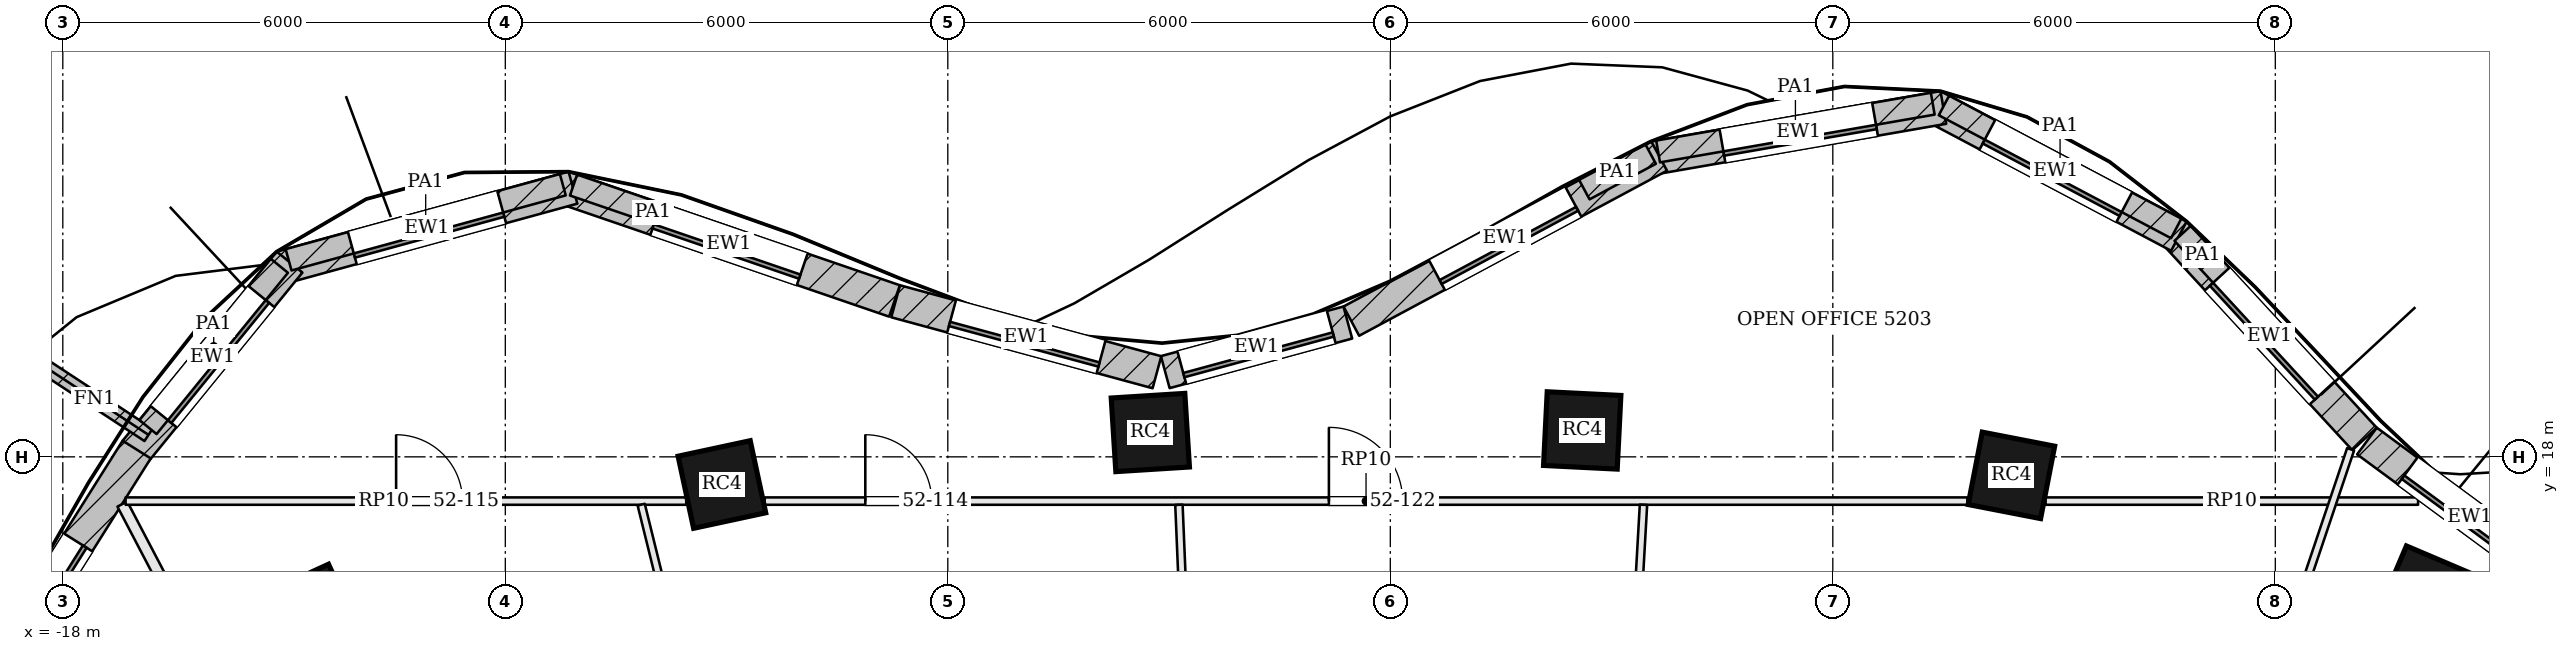
"""IFC4 building model, lengths in metres.
Left out: names, types, materials, properties, quantities, classifications, styles, units other than length and angle.
Written with IfcOpenShell. Run it as: python <this file> out.ifc"""

import sys

from ifc_helpers import new_model, si_unit, direction, frame, frame_2d, origin, origin_2d, place, context, subcontext, project, spatial, rectangle, extrude, element, fill, save


model = new_model("IFC4")
c1 = context("Model", 3, precision=1e-05, world=origin(), true_north=direction((0.0, 1.0)))
c2 = subcontext(c1, "Body", "Model", "MODEL_VIEW")
j1 = project(units=[si_unit("LENGTHUNIT", "METRE"), si_unit("PLANEANGLEUNIT", "RADIAN")], contexts=[c1])
p1 = place(None, origin())
s1 = spatial("IfcSite", under=j1, at=p1, CompositionType="ELEMENT")
p2 = place(p1, origin())
s2 = spatial("IfcBuilding", under=s1, at=p2, CompositionType="ELEMENT")
p3 = place(p2, frame((0.0, 0.0, 213.0)))
s3 = spatial("IfcBuildingStorey", under=s2, at=p3, CompositionType="ELEMENT", Elevation=213.0)
for number, where, z_axis, x_axis in (
    (1, (14.042, 16.136, 0.0), (0.0, 0.0, 1.0), (-0.92, 0.392, 0.0)),
    (2, (8.422, 17.749, 0.0), (0.0, 0.0, 1.0), (-0.982, 0.191, 0.0)),
    (3, (2.602, 18.358, 0.0), (0.0, 0.0, 1.0), (-0.999, 0.05, 0.0)),
    (4, (-3.254, 18.33, 0.0), (0.0, 0.0, 1.0), (-0.998, -0.063, 0.0)),
    (5, (-9.063, 17.625, 0.0), (0.0, 0.0, 1.0), (-0.978, -0.21, 0.0)),
    (6, (-14.643, 15.881, 0.0), (0.0, 0.0, 1.0), (-0.909, -0.417, 0.0)),
):
    element("IfcColumn", number, at=place(p3, frame(where, z_axis=z_axis, x_axis=x_axis)), inside=s3, PredefinedType="COLUMN", context=c2, shape_type="SweptSolid", body=[
        extrude(rectangle(XDim=1.0, YDim=1.0, at=origin_2d()), origin(), (0.0, 0.0, 1.0), 3.9),
    ])
p4 = place(p3, frame((16.036, 16.158, 0.0), z_axis=(0.0, 0.0, 1.0), x_axis=(-0.805181432967, 0.593028549064, 0.0)))
e7 = element("IfcWall", 7, at=p4, inside=s3, PredefinedType="SOLIDWALL", context=c2, shape_type="SweptSolid", body=[
    extrude(rectangle(XDim=3.469, YDim=0.45, at=frame_2d((1.734, 0.0))), origin(), (0.0, 0.0, 1.0), 3.6),
])
p5 = place(p4, frame((0.684, 0.0, 0.9)))
e8 = element("IfcOpeningElement", 8, at=p5, cuts=e7, PredefinedType="OPENING", context=c2, shape_type="SweptSolid", body=[
    extrude(rectangle(XDim=2.1, YDim=1.8, at=frame_2d((1.05, 0.9))), frame((0.0, 0.235, 0.0), z_axis=(0.0, -1.0, 0.0), x_axis=(1.0, 0.0, 0.0)), (0.0, 0.0, 1.0), 0.47),
])
p6 = place(p3, frame((13.209, 18.243, 0.0), z_axis=(0.0, 0.0, 1.0), x_axis=(-0.677612152497, 0.735419452278, 0.0)))
e9 = element("IfcWall", 9, at=p6, inside=s3, PredefinedType="SOLIDWALL", context=c2, shape_type="SweptSolid", body=[
    extrude(rectangle(XDim=3.797, YDim=0.45, at=frame_2d((1.898, 0.0))), origin(), (0.0, 0.0, 1.0), 3.6),
])
p7 = place(p6, frame((0.848, 0.0, 0.9)))
e10 = element("IfcOpeningElement", 10, at=p7, cuts=e9, PredefinedType="OPENING", context=c2, shape_type="SweptSolid", body=[
    extrude(rectangle(XDim=2.1, YDim=1.8, at=frame_2d((1.05, 0.9))), frame((0.0, 0.235, 0.0), z_axis=(0.0, -1.0, 0.0), x_axis=(1.0, 0.0, 0.0)), (0.0, 0.0, 1.0), 0.47),
])
p8 = place(p3, frame((10.693, 20.993, 0.0), z_axis=(0.0, 0.0, 1.0), x_axis=(-0.883817790726, 0.46783128668, 0.0)))
e11 = element("IfcWall", 11, at=p8, inside=s3, PredefinedType="SOLIDWALL", context=c2, shape_type="SweptSolid", body=[
    extrude(rectangle(XDim=3.777, YDim=0.45, at=frame_2d((1.888, 0.0))), origin(), (0.0, 0.0, 1.0), 3.6),
])
p9 = place(p8, frame((0.838, 0.0, 0.9)))
e12 = element("IfcOpeningElement", 12, at=p9, cuts=e11, PredefinedType="OPENING", context=c2, shape_type="SweptSolid", body=[
    extrude(rectangle(XDim=2.1, YDim=1.8, at=frame_2d((1.05, 0.9))), frame((0.0, 0.235, 0.0), z_axis=(0.0, -1.0, 0.0), x_axis=(1.0, 0.0, 0.0)), (0.0, 0.0, 1.0), 0.47),
])
p10 = place(p3, frame((7.499, 22.737, 0.0), z_axis=(0.0, 0.0, 1.0), x_axis=(-0.98521220506, -0.171338585849, 0.0)))
e13 = element("IfcWall", 13, at=p10, inside=s3, PredefinedType="SOLIDWALL", context=c2, shape_type="SweptSolid", body=[
    extrude(rectangle(XDim=3.98, YDim=0.45, at=frame_2d((1.99, 0.0))), origin(), (0.0, 0.0, 1.0), 3.6),
])
p11 = place(p10, frame((0.94, 0.0, 0.9)))
e14 = element("IfcOpeningElement", 14, at=p11, cuts=e13, PredefinedType="OPENING", context=c2, shape_type="SweptSolid", body=[
    extrude(rectangle(XDim=2.1, YDim=1.8, at=frame_2d((1.05, 0.9))), frame((0.0, 0.235, 0.0), z_axis=(0.0, -1.0, 0.0), x_axis=(1.0, 0.0, 0.0)), (0.0, 0.0, 1.0), 0.47),
])
p12 = place(p3, frame((3.646, 22.079, 0.0), z_axis=(0.0, 0.0, 1.0), x_axis=(-0.881279133897, -0.472596115259, 0.0)))
e15 = element("IfcWall", 15, at=p12, inside=s3, PredefinedType="SOLIDWALL", context=c2, shape_type="SweptSolid", body=[
    extrude(rectangle(XDim=4.737, YDim=0.45, at=frame_2d((2.368, 0.0))), origin(), (0.0, 0.0, 1.0), 3.6),
])
p13 = place(p12, frame((1.318, 0.0, 0.9)))
e16 = element("IfcOpeningElement", 16, at=p13, cuts=e15, PredefinedType="OPENING", context=c2, shape_type="SweptSolid", body=[
    extrude(rectangle(XDim=2.1, YDim=1.8, at=frame_2d((1.05, 0.9))), frame((0.0, 0.235, 0.0), z_axis=(0.0, -1.0, 0.0), x_axis=(1.0, 0.0, 0.0)), (0.0, 0.0, 1.0), 0.47),
])
p14 = place(p3, frame((-0.576, 19.821, 0.0), z_axis=(0.0, 0.0, 1.0), x_axis=(-0.965009398019, -0.262215296532, 0.0)))
e17 = element("IfcWall", 17, at=p14, inside=s3, PredefinedType="SOLIDWALL", context=c2, shape_type="SweptSolid", body=[
    extrude(rectangle(XDim=2.565, YDim=0.45, at=frame_2d((1.283, 0.0))), origin(), (0.0, 0.0, 1.0), 3.6),
])
p15 = place(p14, frame((0.233, 0.0, 0.9)))
e18 = element("IfcOpeningElement", 18, at=p15, cuts=e17, PredefinedType="OPENING", context=c2, shape_type="SweptSolid", body=[
    extrude(rectangle(XDim=2.1, YDim=1.8, at=frame_2d((1.05, 0.9))), frame((0.0, 0.235, 0.0), z_axis=(0.0, -1.0, 0.0), x_axis=(1.0, 0.0, 0.0)), (0.0, 0.0, 1.0), 0.47),
])
p16 = place(p3, frame((-3.164, 19.147, 0.0), z_axis=(0.0, 0.0, 1.0), x_axis=(-0.965039479998, 0.262104563191, 0.0)))
e19 = element("IfcWall", 19, at=p16, inside=s3, PredefinedType="SOLIDWALL", context=c2, shape_type="SweptSolid", body=[
    extrude(rectangle(XDim=3.672, YDim=0.45, at=frame_2d((1.836, 0.0))), origin(), (0.0, 0.0, 1.0), 3.6),
])
p17 = place(p16, frame((0.786, 0.0, 0.9)))
e20 = element("IfcOpeningElement", 20, at=p17, cuts=e19, PredefinedType="OPENING", context=c2, shape_type="SweptSolid", body=[
    extrude(rectangle(XDim=2.1, YDim=1.8, at=frame_2d((1.05, 0.9))), frame((0.0, 0.235, 0.0), z_axis=(0.0, -1.0, 0.0), x_axis=(1.0, 0.0, 0.0)), (0.0, 0.0, 1.0), 0.47),
])
p18 = place(p3, frame((-6.723, 20.114, 0.0), z_axis=(0.0, 0.0, 1.0), x_axis=(-0.945947299026, 0.324320377815, 0.0)))
e21 = element("IfcWall", 21, at=p18, inside=s3, PredefinedType="SOLIDWALL", context=c2, shape_type="SweptSolid", body=[
    extrude(rectangle(XDim=4.745, YDim=0.45, at=frame_2d((2.372, 0.0))), origin(), (0.0, 0.0, 1.0), 3.6),
])
p19 = place(p18, frame((1.322, 0.0, 0.9)))
e22 = element("IfcOpeningElement", 22, at=p19, cuts=e21, PredefinedType="OPENING", context=c2, shape_type="SweptSolid", body=[
    extrude(rectangle(XDim=2.1, YDim=1.8, at=frame_2d((1.05, 0.9))), frame((0.0, 0.235, 0.0), z_axis=(0.0, -1.0, 0.0), x_axis=(1.0, 0.0, 0.0)), (0.0, 0.0, 1.0), 0.47),
])
p20 = place(p3, frame((-11.083, 21.65, 0.0), z_axis=(0.0, 0.0, 1.0), x_axis=(-0.964483204983, -0.264144179011, 0.0)))
e23 = element("IfcWall", 23, at=p20, inside=s3, PredefinedType="SOLIDWALL", context=c2, shape_type="SweptSolid", body=[
    extrude(rectangle(XDim=4.104, YDim=0.45, at=frame_2d((2.052, 0.0))), origin(), (0.0, 0.0, 1.0), 3.6),
])
p21 = place(p20, frame((1.002, 0.0, 0.9)))
e24 = element("IfcOpeningElement", 24, at=p21, cuts=e23, PredefinedType="OPENING", context=c2, shape_type="SweptSolid", body=[
    extrude(rectangle(XDim=2.1, YDim=1.8, at=frame_2d((1.05, 0.9))), frame((0.0, 0.235, 0.0), z_axis=(0.0, -1.0, 0.0), x_axis=(1.0, 0.0, 0.0)), (0.0, 0.0, 1.0), 0.47),
])
p22 = place(p3, frame((-14.926, 20.641, 0.0), z_axis=(0.0, 0.0, 1.0), x_axis=(-0.631548074669, -0.775336720001, 0.0)))
e25 = element("IfcWall", 25, at=p22, inside=s3, PredefinedType="SOLIDWALL", context=c2, shape_type="SweptSolid", body=[
    extrude(rectangle(XDim=3.308, YDim=0.45, at=frame_2d((1.654, 0.0))), origin(), (0.0, 0.0, 1.0), 3.6),
])
p23 = place(p22, frame((0.604, 0.0, 0.9)))
e26 = element("IfcOpeningElement", 26, at=p23, cuts=e25, PredefinedType="OPENING", context=c2, shape_type="SweptSolid", body=[
    extrude(rectangle(XDim=2.1, YDim=1.8, at=frame_2d((1.05, 0.9))), frame((0.0, 0.235, 0.0), z_axis=(0.0, -1.0, 0.0), x_axis=(1.0, 0.0, 0.0)), (0.0, 0.0, 1.0), 0.47),
])
p24 = place(p3, frame((-16.998, 18.099, 0.0), z_axis=(0.0, 0.0, 1.0), x_axis=(-0.532745661304, -0.846275404559, 0.0)))
e27 = element("IfcWall", 27, at=p24, inside=s3, PredefinedType="SOLIDWALL", context=c2, shape_type="SweptSolid", body=[
    extrude(rectangle(XDim=5.076, YDim=0.45, at=frame_2d((2.538, 0.0))), origin(), (0.0, 0.0, 1.0), 3.6),
])
p25 = place(p24, frame((1.488, 0.0, 0.9)))
e28 = element("IfcOpeningElement", 28, at=p25, cuts=e27, PredefinedType="OPENING", context=c2, shape_type="SweptSolid", body=[
    extrude(rectangle(XDim=2.1, YDim=1.8, at=frame_2d((1.05, 0.9))), frame((0.0, 0.235, 0.0), z_axis=(0.0, -1.0, 0.0), x_axis=(1.0, 0.0, 0.0)), (0.0, 0.0, 1.0), 0.47),
])
p26 = place(p3, frame((-16.838, 18.298, 0.0), z_axis=(0.0, 0.0, 1.0), x_axis=(-0.835871900419, 0.548924554097, 0.0)))
e29 = element("IfcWall", 29, at=p26, inside=s3, PredefinedType="SOLIDWALL", context=c2, shape_type="SweptSolid", body=[
    extrude(rectangle(XDim=1.75, YDim=0.2, at=frame_2d((0.875, 0.0))), origin(), (0.0, 0.0, 1.0), 3.6),
])
p27 = place(p3, frame((11.287, 20.44, 3.9), z_axis=(0.0, 0.0, 1.0), x_axis=(-0.67762296798, 0.735409486793, 0.0)))
e30 = element("IfcWall", 30, at=p27, inside=s3, PredefinedType="PARAPET", context=c2, shape_type="SweptSolid", body=[
    extrude(rectangle(XDim=0.803, YDim=0.3, at=frame_2d((0.401, 0.0))), origin(), (0.0, 0.0, 1.0), 1.1),
])
p28 = place(p3, frame((10.656, 21.097, 3.9), z_axis=(0.0, 0.0, 1.0), x_axis=(-0.883797916666, 0.467868830439, 0.0)))
e31 = element("IfcWall", 31, at=p28, inside=s3, PredefinedType="PARAPET", context=c2, shape_type="SweptSolid", body=[
    extrude(rectangle(XDim=3.563, YDim=0.3, at=frame_2d((1.781, 0.0))), origin(), (0.0, 0.0, 1.0), 1.1),
])
p29 = place(p3, frame((7.355, 22.789, 3.9), z_axis=(0.0, 0.0, 1.0), x_axis=(-0.985197529684, -0.171422949176, 0.0)))
e32 = element("IfcWall", 32, at=p29, inside=s3, PredefinedType="PARAPET", context=c2, shape_type="SweptSolid", body=[
    extrude(rectangle(XDim=3.78, YDim=0.3, at=frame_2d((1.89, 0.0))), origin(), (0.0, 0.0, 1.0), 1.1),
])
p30 = place(p3, frame((3.53, 22.106, 3.9), z_axis=(0.0, 0.0, 1.0), x_axis=(-0.881284245626, -0.472586582979, 0.0)))
e33 = element("IfcWall", 33, at=p30, inside=s3, PredefinedType="PARAPET", context=c2, shape_type="SweptSolid", body=[
    extrude(rectangle(XDim=1.02, YDim=0.3, at=frame_2d((0.51, 0.0))), origin(), (0.0, 0.0, 1.0), 1.1),
])
p31 = place(p3, frame((-8.923, 20.948, 3.9), z_axis=(0.0, 0.0, 1.0), x_axis=(-0.945944064447, 0.324329811976, 0.0)))
e34 = element("IfcWall", 34, at=p31, inside=s3, PredefinedType="PARAPET", context=c2, shape_type="SweptSolid", body=[
    extrude(rectangle(XDim=2.275, YDim=0.3, at=frame_2d((1.137, 0.0))), origin(), (0.0, 0.0, 1.0), 1.1),
])
p32 = place(p3, frame((-11.22, 21.69, 3.9), z_axis=(0.0, 0.0, 1.0), x_axis=(-0.964484148392, -0.264140734271, 0.0)))
e35 = element("IfcWall", 35, at=p32, inside=s3, PredefinedType="PARAPET", context=c2, shape_type="SweptSolid", body=[
    extrude(rectangle(XDim=3.855, YDim=0.3, at=frame_2d((1.928, 0.0))), origin(), (0.0, 0.0, 1.0), 1.1),
])
p33 = place(p3, frame((-15.063, 20.591, 3.9), z_axis=(0.0, 0.0, 1.0), x_axis=(-0.631553484363, -0.77533231352, 0.0)))
e36 = element("IfcWall", 36, at=p33, inside=s3, PredefinedType="PARAPET", context=c2, shape_type="SweptSolid", body=[
    extrude(rectangle(XDim=2.82, YDim=0.3, at=frame_2d((1.41, 0.0))), origin(), (0.0, 0.0, 1.0), 1.1),
])
p34 = place(p3, frame((-17.193, 17.36, 0.0), z_axis=(0.0, 0.0, 1.0), x_axis=(0.463995225493, -0.885837699988, 0.0)))
e37 = element("IfcWall", 37, at=p34, inside=s3, PredefinedType="PARTITIONING", context=c2, shape_type="SweptSolid", body=[
    extrude(rectangle(XDim=4.651, YDim=0.15, at=frame_2d((2.325, 0.0))), origin(), (0.0, 0.0, 1.0), 3.084),
])
p35 = place(p3, frame((-17.149, 17.4, 0.0), z_axis=(0.0, 0.0, 1.0), x_axis=(1.0, 0.0, 0.0)))
e38 = element("IfcWall", 38, at=p35, inside=s3, PredefinedType="PARTITIONING", context=c2, shape_type="SweptSolid", body=[
    extrude(rectangle(XDim=7.602, YDim=0.1, at=frame_2d((3.801, 0.0))), origin(), (0.0, 0.0, 1.0), 2.984),
])
p36 = place(p35, frame((3.668, 0.0, 0.0)))
e39 = element("IfcOpeningElement", 39, at=p36, cuts=e38, PredefinedType="OPENING", context=c2, shape_type="SweptSolid", body=[
    extrude(rectangle(XDim=0.9, YDim=2.1, at=frame_2d((0.45, 1.05))), frame((0.0, 0.06, 0.0), z_axis=(0.0, -1.0, 0.0), x_axis=(1.0, 0.0, 0.0)), (0.0, 0.0, 1.0), 0.12),
])
p37 = place(p3, frame((-8.483, 17.4, 0.0), z_axis=(0.0, 0.0, 1.0), x_axis=(1.0, 0.0, 0.0)))
e40 = element("IfcWall", 40, at=p37, inside=s3, PredefinedType="PARTITIONING", context=c2, shape_type="SweptSolid", body=[
    extrude(rectangle(XDim=16.307, YDim=0.1, at=frame_2d((8.154, 0.0))), origin(), (0.0, 0.0, 1.0), 2.984),
])
p38 = place(p37, frame((1.364, 0.0, 0.0)))
e41 = element("IfcOpeningElement", 41, at=p38, cuts=e40, PredefinedType="OPENING", context=c2, shape_type="SweptSolid", body=[
    extrude(rectangle(XDim=0.9, YDim=2.1, at=frame_2d((0.45, 1.05))), frame((0.0, 0.06, 0.0), z_axis=(0.0, -1.0, 0.0), x_axis=(1.0, 0.0, 0.0)), (0.0, 0.0, 1.0), 0.12),
])
p39 = place(p37, frame((7.65, 0.0, 0.0)))
e42 = element("IfcOpeningElement", 42, at=p39, cuts=e40, PredefinedType="OPENING", context=c2, shape_type="SweptSolid", body=[
    extrude(rectangle(XDim=1.0, YDim=2.4, at=frame_2d((0.5, 1.2))), frame((0.0, 0.06, 0.0), z_axis=(0.0, -1.0, 0.0), x_axis=(1.0, 0.0, 0.0)), (0.0, 0.0, 1.0), 0.12),
])
p40 = place(p3, frame((8.884, 17.4, 0.0), z_axis=(0.0, 0.0, 1.0), x_axis=(1.0, 0.0, 0.0)))
e43 = element("IfcWall", 43, at=p40, inside=s3, PredefinedType="PARTITIONING", context=c2, shape_type="SweptSolid", body=[
    extrude(rectangle(XDim=5.052, YDim=0.1, at=frame_2d((2.526, 0.0))), origin(), (0.0, 0.0, 1.0), 2.984),
])
p41 = place(p3, frame((11.664, 14.071, 0.0), z_axis=(0.0, 0.0, 1.0), x_axis=(0.319050122348, 0.947737843198, 0.0)))
e44 = element("IfcWall", 44, at=p41, inside=s3, PredefinedType="PARTITIONING", context=c2, shape_type="SweptSolid", body=[
    extrude(rectangle(XDim=4.254, YDim=0.1, at=frame_2d((2.127, 0.0))), origin(), (0.0, 0.0, 1.0), 2.984),
])
p42 = place(p3, frame((3.247, 14.075, 0.0), z_axis=(0.0, 0.0, 1.0), x_axis=(0.056636488477, 0.998394865859, 0.0)))
e45 = element("IfcWall", 45, at=p42, inside=s3, PredefinedType="PARTITIONING", context=c2, shape_type="SweptSolid", body=[
    extrude(rectangle(XDim=3.281, YDim=0.1, at=frame_2d((1.64, 0.0))), origin(), (0.0, 0.0, 1.0), 2.984),
])
p43 = place(p3, frame((-2.729, 14.075, 0.0), z_axis=(0.0, 0.0, 1.0), x_axis=(-0.042005382394, 0.99911738442, 0.0)))
e46 = element("IfcWall", 46, at=p43, inside=s3, PredefinedType="PARTITIONING", context=c2, shape_type="SweptSolid", body=[
    extrude(rectangle(XDim=3.278, YDim=0.1, at=frame_2d((1.639, 0.0))), origin(), (0.0, 0.0, 1.0), 2.984),
])
p44 = place(p3, frame((-9.347, 14.073, 0.0), z_axis=(0.0, 0.0, 1.0), x_axis=(-0.239847329474, 0.970810619299, 0.0)))
e47 = element("IfcWall", 47, at=p44, inside=s3, PredefinedType="PARTITIONING", context=c2, shape_type="SweptSolid", body=[
    extrude(rectangle(XDim=3.377, YDim=0.1, at=frame_2d((1.689, 0.0))), origin(), (0.0, 0.0, 1.0), 2.984),
])
p45 = place(p5, origin())
e48 = element("IfcWindow", 48, at=p45, inside=s3, PartitioningType="SINGLE_PANEL", PredefinedType="WINDOW", context=c2, shape_type="SweptSolid", body=[
    extrude(rectangle(XDim=2.1, YDim=1.8, at=frame_2d((1.05, 0.9))), frame((0.0, 0.135, 0.0), z_axis=(0.0, -1.0, 0.0), x_axis=(1.0, 0.0, 0.0)), (0.0, 0.0, 1.0), 0.06),
])
fill(e8, e48)
p46 = place(p7, origin())
e49 = element("IfcWindow", 49, at=p46, inside=s3, PartitioningType="SINGLE_PANEL", PredefinedType="WINDOW", context=c2, shape_type="SweptSolid", body=[
    extrude(rectangle(XDim=2.1, YDim=1.8, at=frame_2d((1.05, 0.9))), frame((0.0, 0.135, 0.0), z_axis=(0.0, -1.0, 0.0), x_axis=(1.0, 0.0, 0.0)), (0.0, 0.0, 1.0), 0.06),
])
fill(e10, e49)
p47 = place(p9, origin())
e50 = element("IfcWindow", 50, at=p47, inside=s3, PartitioningType="SINGLE_PANEL", PredefinedType="WINDOW", context=c2, shape_type="SweptSolid", body=[
    extrude(rectangle(XDim=2.1, YDim=1.8, at=frame_2d((1.05, 0.9))), frame((0.0, 0.135, 0.0), z_axis=(0.0, -1.0, 0.0), x_axis=(1.0, 0.0, 0.0)), (0.0, 0.0, 1.0), 0.06),
])
fill(e12, e50)
p48 = place(p11, origin())
e51 = element("IfcWindow", 51, at=p48, inside=s3, PartitioningType="SINGLE_PANEL", PredefinedType="WINDOW", context=c2, shape_type="SweptSolid", body=[
    extrude(rectangle(XDim=2.1, YDim=1.8, at=frame_2d((1.05, 0.9))), frame((0.0, 0.135, 0.0), z_axis=(0.0, -1.0, 0.0), x_axis=(1.0, 0.0, 0.0)), (0.0, 0.0, 1.0), 0.06),
])
fill(e14, e51)
p49 = place(p13, origin())
e52 = element("IfcWindow", 52, at=p49, inside=s3, PartitioningType="SINGLE_PANEL", PredefinedType="WINDOW", context=c2, shape_type="SweptSolid", body=[
    extrude(rectangle(XDim=2.1, YDim=1.8, at=frame_2d((1.05, 0.9))), frame((0.0, 0.135, 0.0), z_axis=(0.0, -1.0, 0.0), x_axis=(1.0, 0.0, 0.0)), (0.0, 0.0, 1.0), 0.06),
])
fill(e16, e52)
p50 = place(p15, origin())
e53 = element("IfcWindow", 53, at=p50, inside=s3, PartitioningType="SINGLE_PANEL", PredefinedType="WINDOW", context=c2, shape_type="SweptSolid", body=[
    extrude(rectangle(XDim=2.1, YDim=1.8, at=frame_2d((1.05, 0.9))), frame((0.0, 0.135, 0.0), z_axis=(0.0, -1.0, 0.0), x_axis=(1.0, 0.0, 0.0)), (0.0, 0.0, 1.0), 0.06),
])
fill(e18, e53)
p51 = place(p17, origin())
e54 = element("IfcWindow", 54, at=p51, inside=s3, PartitioningType="SINGLE_PANEL", PredefinedType="WINDOW", context=c2, shape_type="SweptSolid", body=[
    extrude(rectangle(XDim=2.1, YDim=1.8, at=frame_2d((1.05, 0.9))), frame((0.0, 0.135, 0.0), z_axis=(0.0, -1.0, 0.0), x_axis=(1.0, 0.0, 0.0)), (0.0, 0.0, 1.0), 0.06),
])
fill(e20, e54)
p52 = place(p19, origin())
e55 = element("IfcWindow", 55, at=p52, inside=s3, PartitioningType="SINGLE_PANEL", PredefinedType="WINDOW", context=c2, shape_type="SweptSolid", body=[
    extrude(rectangle(XDim=2.1, YDim=1.8, at=frame_2d((1.05, 0.9))), frame((0.0, 0.135, 0.0), z_axis=(0.0, -1.0, 0.0), x_axis=(1.0, 0.0, 0.0)), (0.0, 0.0, 1.0), 0.06),
])
fill(e22, e55)
p53 = place(p21, origin())
e56 = element("IfcWindow", 56, at=p53, inside=s3, PartitioningType="SINGLE_PANEL", PredefinedType="WINDOW", context=c2, shape_type="SweptSolid", body=[
    extrude(rectangle(XDim=2.1, YDim=1.8, at=frame_2d((1.05, 0.9))), frame((0.0, 0.135, 0.0), z_axis=(0.0, -1.0, 0.0), x_axis=(1.0, 0.0, 0.0)), (0.0, 0.0, 1.0), 0.06),
])
fill(e24, e56)
p54 = place(p23, origin())
e57 = element("IfcWindow", 57, at=p54, inside=s3, PartitioningType="SINGLE_PANEL", PredefinedType="WINDOW", context=c2, shape_type="SweptSolid", body=[
    extrude(rectangle(XDim=2.1, YDim=1.8, at=frame_2d((1.05, 0.9))), frame((0.0, 0.135, 0.0), z_axis=(0.0, -1.0, 0.0), x_axis=(1.0, 0.0, 0.0)), (0.0, 0.0, 1.0), 0.06),
])
fill(e26, e57)
p55 = place(p25, origin())
e58 = element("IfcWindow", 58, at=p55, inside=s3, PartitioningType="SINGLE_PANEL", PredefinedType="WINDOW", context=c2, shape_type="SweptSolid", body=[
    extrude(rectangle(XDim=2.1, YDim=1.8, at=frame_2d((1.05, 0.9))), frame((0.0, 0.135, 0.0), z_axis=(0.0, -1.0, 0.0), x_axis=(1.0, 0.0, 0.0)), (0.0, 0.0, 1.0), 0.06),
])
fill(e28, e58)
p56 = place(p38, origin())
e59 = element("IfcDoor", 59, at=p56, inside=s3, OperationType="SINGLE_SWING_LEFT", PredefinedType="DOOR", context=c2, shape_type="SweptSolid", body=[
    extrude(rectangle(XDim=0.9, YDim=2.1, at=frame_2d((0.45, 1.05))), frame((0.0, 0.025, 0.0), z_axis=(0.0, -1.0, 0.0), x_axis=(1.0, 0.0, 0.0)), (0.0, 0.0, 1.0), 0.05),
])
fill(e41, e59)
p57 = place(p36, origin())
e60 = element("IfcDoor", 60, at=p57, inside=s3, OperationType="SINGLE_SWING_LEFT", PredefinedType="DOOR", context=c2, shape_type="SweptSolid", body=[
    extrude(rectangle(XDim=0.9, YDim=2.1, at=frame_2d((0.45, 1.05))), frame((0.0, 0.025, 0.0), z_axis=(0.0, -1.0, 0.0), x_axis=(1.0, 0.0, 0.0)), (0.0, 0.0, 1.0), 0.05),
])
fill(e39, e60)
p58 = place(p39, origin())
e61 = element("IfcDoor", 61, at=p58, inside=s3, OperationType="SINGLE_SWING_LEFT", PredefinedType="DOOR", context=c2, shape_type="SweptSolid", body=[
    extrude(rectangle(XDim=1.0, YDim=2.4, at=frame_2d((0.5, 1.2))), frame((0.0, 0.025, 0.0), z_axis=(0.0, -1.0, 0.0), x_axis=(1.0, 0.0, 0.0)), (0.0, 0.0, 1.0), 0.05),
])
fill(e42, e61)
save(model, sys.argv[1])
